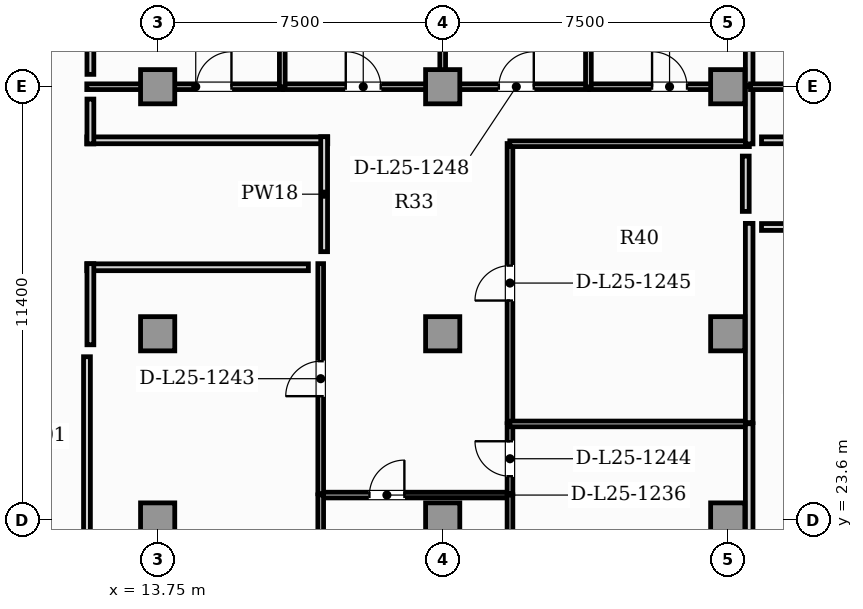
"""IFC4 building model, lengths in metres.
Left out: names, types, materials, properties, quantities, classifications, styles, units other than length and angle.
Written with IfcOpenShell. Run it as: python <this file> out.ifc"""

import sys

from ifc_helpers import new_model, si_unit, direction, frame, frame_2d, origin, origin_2d, place, context, subcontext, project, spatial, rectangle, extrude, element, fill, save


model = new_model("IFC4")
c1 = context("Model", 3, precision=1e-05, world=origin(), true_north=direction((0.0, 1.0)))
c2 = subcontext(c1, "Body", "Model", "MODEL_VIEW")
j1 = project(units=[si_unit("LENGTHUNIT", "METRE"), si_unit("PLANEANGLEUNIT", "RADIAN")], contexts=[c1])
p1 = place(None, origin())
s1 = spatial("IfcSite", under=j1, at=p1, CompositionType="ELEMENT")
p2 = place(p1, origin())
s2 = spatial("IfcBuilding", under=s1, at=p2, CompositionType="ELEMENT")
p3 = place(p2, frame((0.0, 0.0, 104.15)))
s3 = spatial("IfcBuildingStorey", under=s2, at=p3, CompositionType="ELEMENT", Elevation=104.15)
for number, where, z_axis, x_axis in (
    (1, (13.75, 23.6, 0.0), (0.0, 0.0, 1.0), (1.0, 0.0, 0.0)),
    (2, (21.25, 23.6, 0.0), (0.0, 0.0, 1.0), (1.0, 0.0, 0.0)),
    (3, (28.75, 23.6, 0.0), (0.0, 0.0, 1.0), (1.0, 0.0, 0.0)),
    (4, (13.75, 28.5, 0.0), (0.0, 0.0, 1.0), (1.0, 0.0, 0.0)),
    (5, (21.25, 28.5, 0.0), (0.0, 0.0, 1.0), (1.0, 0.0, 0.0)),
    (6, (28.75, 28.5, 0.0), (0.0, 0.0, 1.0), (1.0, 0.0, 0.0)),
    (7, (13.75, 35.0, 0.0), (0.0, 0.0, 1.0), (1.0, 0.0, 0.0)),
    (8, (21.25, 35.0, 0.0), (0.0, 0.0, 1.0), (1.0, 0.0, 0.0)),
    (9, (28.75, 35.0, 0.0), (0.0, 0.0, 1.0), (1.0, 0.0, 0.0)),
):
    element("IfcColumn", number, at=place(p3, frame(where, z_axis=z_axis, x_axis=x_axis)), inside=s3, PredefinedType="COLUMN", context=c2, shape_type="SweptSolid", body=[
        extrude(rectangle(XDim=0.9, YDim=0.9, at=origin_2d()), origin(), (0.0, 0.0, 1.0), 3.85),
    ])
p4 = place(p3, frame((11.89, 17.465, 0.0), z_axis=(0.0, 0.0, 1.0), x_axis=(0.0, 1.0, 0.0)))
e10 = element("IfcWall", 10, at=p4, inside=s3, PredefinedType="PARTITIONING", context=c2, shape_type="SweptSolid", body=[
    extrude(rectangle(XDim=10.43, YDim=0.18, at=frame_2d((5.215, 0.0))), origin(), (0.0, 0.0, 1.0), 3.6),
])
p5 = place(p3, frame((18.035, 24.256, 0.0), z_axis=(0.0, 0.0, 1.0), x_axis=(1.0, 0.0, 0.0)))
e11 = element("IfcWall", 11, at=p5, inside=s3, PredefinedType="PARTITIONING", context=c2, shape_type="SweptSolid", body=[
    extrude(rectangle(XDim=4.99, YDim=0.15, at=frame_2d((2.495, 0.0))), origin(), (0.0, 0.0, 1.0), 3.6),
])
p6 = place(p5, frame((1.287, 0.0, 0.0)))
e12 = element("IfcOpeningElement", 12, at=p6, cuts=e11, PredefinedType="OPENING", context=c2, shape_type="SweptSolid", body=[
    extrude(rectangle(XDim=0.92, YDim=2.1, at=frame_2d((0.46, 1.05))), frame((0.0, 0.085, 0.0), z_axis=(0.0, -1.0, 0.0), x_axis=(1.0, 0.0, 0.0)), (0.0, 0.0, 1.0), 0.17),
])
p7 = place(p3, frame((18.04, 17.465, 0.0), z_axis=(0.0, 0.0, 1.0), x_axis=(0.0, 1.0, 0.0)))
e13 = element("IfcWall", 13, at=p7, inside=s3, PredefinedType="PARTITIONING", context=c2, shape_type="SweptSolid", body=[
    extrude(rectangle(XDim=6.795, YDim=0.15, at=frame_2d((3.398, 0.0))), origin(), (0.0, 0.0, 1.0), 3.6),
])
p8 = place(p7, frame((2.938, 0.0, 0.0)))
e14 = element("IfcOpeningElement", 14, at=p8, cuts=e13, PredefinedType="OPENING", context=c2, shape_type="SweptSolid", body=[
    extrude(rectangle(XDim=0.92, YDim=2.1, at=frame_2d((0.46, 1.05))), frame((0.0, 0.085, 0.0), z_axis=(0.0, -1.0, 0.0), x_axis=(1.0, 0.0, 0.0)), (0.0, 0.0, 1.0), 0.17),
])
p9 = place(p3, frame((23.02, 20.899, 0.0), z_axis=(0.0, 0.0, 1.0), x_axis=(0.0, 1.0, 0.0)))
e15 = element("IfcWall", 15, at=p9, inside=s3, PredefinedType="PARTITIONING", context=c2, shape_type="SweptSolid", body=[
    extrude(rectangle(XDim=3.362, YDim=0.15, at=frame_2d((1.681, 0.0))), origin(), (0.0, 0.0, 1.0), 3.6),
])
p10 = place(p9, frame((1.221, 0.0, 0.0)))
e16 = element("IfcOpeningElement", 16, at=p10, cuts=e15, PredefinedType="OPENING", context=c2, shape_type="SweptSolid", body=[
    extrude(rectangle(XDim=0.92, YDim=2.1, at=frame_2d((0.46, 1.05))), frame((0.0, 0.085, 0.0), z_axis=(0.0, -1.0, 0.0), x_axis=(1.0, 0.0, 0.0)), (0.0, 0.0, 1.0), 0.17),
])
p11 = place(p3, frame((18.04, 24.291, 0.0), z_axis=(0.0, 0.0, 1.0), x_axis=(0.0, 1.0, 0.0)))
e17 = element("IfcWall", 17, at=p11, inside=s3, PredefinedType="PARTITIONING", context=c2, shape_type="SweptSolid", body=[
    extrude(rectangle(XDim=6.054, YDim=0.15, at=frame_2d((3.027, 0.0))), origin(), (0.0, 0.0, 1.0), 3.6),
])
p12 = place(p11, frame((2.567, 0.0, 0.0)))
e18 = element("IfcOpeningElement", 18, at=p12, cuts=e17, PredefinedType="OPENING", context=c2, shape_type="SweptSolid", body=[
    extrude(rectangle(XDim=0.92, YDim=2.1, at=frame_2d((0.46, 1.05))), frame((0.0, 0.085, 0.0), z_axis=(0.0, -1.0, 0.0), x_axis=(1.0, 0.0, 0.0)), (0.0, 0.0, 1.0), 0.17),
])
p13 = place(p3, frame((23.02, 24.291, 0.0), z_axis=(0.0, 0.0, 1.0), x_axis=(0.0, 1.0, 0.0)))
e19 = element("IfcWall", 19, at=p13, inside=s3, PredefinedType="PARTITIONING", context=c2, shape_type="SweptSolid", body=[
    extrude(rectangle(XDim=1.842, YDim=0.15, at=frame_2d((0.921, 0.0))), origin(), (0.0, 0.0, 1.0), 3.6),
])
p14 = place(p13, frame((0.461, 0.0, 0.0)))
e20 = element("IfcOpeningElement", 20, at=p14, cuts=e19, PredefinedType="OPENING", context=c2, shape_type="SweptSolid", body=[
    extrude(rectangle(XDim=0.92, YDim=2.1, at=frame_2d((0.46, 1.05))), frame((0.0, 0.085, 0.0), z_axis=(0.0, -1.0, 0.0), x_axis=(1.0, 0.0, 0.0)), (0.0, 0.0, 1.0), 0.17),
])
p15 = place(p3, frame((23.02, 26.162, 0.0), z_axis=(0.0, 0.0, 1.0), x_axis=(0.0, 1.0, 0.0)))
e21 = element("IfcWall", 21, at=p15, inside=s3, PredefinedType="PARTITIONING", context=c2, shape_type="SweptSolid", body=[
    extrude(rectangle(XDim=7.343, YDim=0.15, at=frame_2d((3.671, 0.0))), origin(), (0.0, 0.0, 1.0), 3.6),
])
p16 = place(p15, frame((3.211, 0.0, 0.0)))
e22 = element("IfcOpeningElement", 22, at=p16, cuts=e21, PredefinedType="OPENING", context=c2, shape_type="SweptSolid", body=[
    extrude(rectangle(XDim=0.92, YDim=2.1, at=frame_2d((0.46, 1.05))), frame((0.0, 0.085, 0.0), z_axis=(0.0, -1.0, 0.0), x_axis=(1.0, 0.0, 0.0)), (0.0, 0.0, 1.0), 0.17),
])
p17 = place(p3, frame((23.015, 33.5, 0.0), z_axis=(0.0, 0.0, 1.0), x_axis=(1.0, 0.0, 0.0)))
e23 = element("IfcWall", 23, at=p17, inside=s3, PredefinedType="PARTITIONING", context=c2, shape_type="SweptSolid", body=[
    extrude(rectangle(XDim=6.304, YDim=0.15, at=frame_2d((3.152, 0.0))), origin(), (0.0, 0.0, 1.0), 3.6),
])
p18 = place(p3, frame((11.885, 35.0, 0.0), z_axis=(0.0, 0.0, 1.0), x_axis=(1.0, 0.0, 0.0)))
e24 = element("IfcWall", 24, at=p18, inside=s3, PredefinedType="PARTITIONING", context=c2, shape_type="SweptSolid", body=[
    extrude(rectangle(XDim=5.149, YDim=0.15, at=frame_2d((2.574, 0.0))), origin(), (0.0, 0.0, 1.0), 2.983),
])
p19 = place(p18, frame((2.887, 0.0, 0.0)))
e25 = element("IfcOpeningElement", 25, at=p19, cuts=e24, PredefinedType="OPENING", context=c2, shape_type="SweptSolid", body=[
    extrude(rectangle(XDim=0.92, YDim=2.1, at=frame_2d((0.46, 1.05))), frame((0.0, 0.085, 0.0), z_axis=(0.0, -1.0, 0.0), x_axis=(1.0, 0.0, 0.0)), (0.0, 0.0, 1.0), 0.17),
])
p20 = place(p3, frame((17.064, 35.0, 0.0), z_axis=(0.0, 0.0, 1.0), x_axis=(1.0, 0.0, 0.0)))
e26 = element("IfcWall", 26, at=p20, inside=s3, PredefinedType="PARTITIONING", context=c2, shape_type="SweptSolid", body=[
    extrude(rectangle(XDim=4.191, YDim=0.15, at=frame_2d((2.095, 0.0))), origin(), (0.0, 0.0, 1.0), 2.983),
])
p21 = place(p20, frame((1.635, 0.0, 0.0)))
e27 = element("IfcOpeningElement", 27, at=p21, cuts=e26, PredefinedType="OPENING", context=c2, shape_type="SweptSolid", body=[
    extrude(rectangle(XDim=0.92, YDim=2.1, at=frame_2d((0.46, 1.05))), frame((0.0, 0.085, 0.0), z_axis=(0.0, -1.0, 0.0), x_axis=(1.0, 0.0, 0.0)), (0.0, 0.0, 1.0), 0.17),
])
p22 = place(p3, frame((21.285, 35.0, 0.0), z_axis=(0.0, 0.0, 1.0), x_axis=(1.0, 0.0, 0.0)))
e28 = element("IfcWall", 28, at=p22, inside=s3, PredefinedType="PARTITIONING", context=c2, shape_type="SweptSolid", body=[
    extrude(rectangle(XDim=3.804, YDim=0.15, at=frame_2d((1.902, 0.0))), origin(), (0.0, 0.0, 1.0), 2.983),
])
p23 = place(p22, frame((1.442, 0.0, 0.0)))
e29 = element("IfcOpeningElement", 29, at=p23, cuts=e28, PredefinedType="OPENING", context=c2, shape_type="SweptSolid", body=[
    extrude(rectangle(XDim=0.92, YDim=2.1, at=frame_2d((0.46, 1.05))), frame((0.0, 0.085, 0.0), z_axis=(0.0, -1.0, 0.0), x_axis=(1.0, 0.0, 0.0)), (0.0, 0.0, 1.0), 0.17),
])
p24 = place(p3, frame((25.119, 35.0, 0.0), z_axis=(0.0, 0.0, 1.0), x_axis=(1.0, 0.0, 0.0)))
e30 = element("IfcWall", 30, at=p24, inside=s3, PredefinedType="PARTITIONING", context=c2, shape_type="SweptSolid", body=[
    extrude(rectangle(XDim=4.2, YDim=0.15, at=frame_2d((2.1, 0.0))), origin(), (0.0, 0.0, 1.0), 2.983),
])
p25 = place(p24, frame((1.64, 0.0, 0.0)))
e31 = element("IfcOpeningElement", 31, at=p25, cuts=e30, PredefinedType="OPENING", context=c2, shape_type="SweptSolid", body=[
    extrude(rectangle(XDim=0.92, YDim=2.1, at=frame_2d((0.46, 1.05))), frame((0.0, 0.085, 0.0), z_axis=(0.0, -1.0, 0.0), x_axis=(1.0, 0.0, 0.0)), (0.0, 0.0, 1.0), 0.17),
])
p26 = place(p3, frame((29.314, 33.495, 0.0), z_axis=(0.0, 0.0, 1.0), x_axis=(0.0, 1.0, 0.0)))
e32 = element("IfcWall", 32, at=p26, inside=s3, PredefinedType="PARTITIONING", context=c2, shape_type="SweptSolid", body=[
    extrude(rectangle(XDim=1.51, YDim=0.2, at=frame_2d((0.755, 0.0))), origin(), (0.0, 0.0, 1.0), 3.6),
])
p27 = place(p3, frame((23.015, 26.127, 0.0), z_axis=(0.0, 0.0, 1.0), x_axis=(1.0, 0.0, 0.0)))
e33 = element("IfcWall", 33, at=p27, inside=s3, PredefinedType="PARTITIONING", context=c2, shape_type="SweptSolid", body=[
    extrude(rectangle(XDim=6.304, YDim=0.15, at=frame_2d((3.152, 0.0))), origin(), (0.0, 0.0, 1.0), 3.6),
])
p28 = place(p3, frame((29.314, 20.899, 0.0), z_axis=(0.0, 0.0, 1.0), x_axis=(0.0, 1.0, 0.0)))
e34 = element("IfcWall", 34, at=p28, inside=s3, PredefinedType="PARTITIONING", context=c2, shape_type="SweptSolid", body=[
    extrude(rectangle(XDim=5.234, YDim=0.2, at=frame_2d((2.617, 0.0))), origin(), (0.0, 0.0, 1.0), 3.6),
])
p29 = place(p3, frame((29.314, 26.162, 0.0), z_axis=(0.0, 0.0, 1.0), x_axis=(0.0, 1.0, 0.0)))
e35 = element("IfcWall", 35, at=p29, inside=s3, PredefinedType="PARTITIONING", context=c2, shape_type="SweptSolid", body=[
    extrude(rectangle(XDim=5.242, YDim=0.2, at=frame_2d((2.621, 0.0))), origin(), (0.0, 0.0, 1.0), 3.6),
])
p30 = place(p3, frame((17.029, 34.995, 0.0), z_axis=(0.0, 0.0, 1.0), x_axis=(0.0, 1.0, 0.0)))
e36 = element("IfcWall", 36, at=p30, inside=s3, PredefinedType="PARTITIONING", context=c2, shape_type="SweptSolid", body=[
    extrude(rectangle(XDim=7.995, YDim=0.15, at=frame_2d((3.998, 0.0))), origin(), (0.0, 0.0, 1.0), 3.6),
])
p31 = place(p3, frame((21.25, 34.995, 0.0), z_axis=(0.0, 0.0, 1.0), x_axis=(0.0, 1.0, 0.0)))
e37 = element("IfcWall", 37, at=p31, inside=s3, PredefinedType="PARTITIONING", context=c2, shape_type="SweptSolid", body=[
    extrude(rectangle(XDim=7.907, YDim=0.15, at=frame_2d((3.954, 0.0))), origin(), (0.0, 0.0, 1.0), 3.6),
])
p32 = place(p3, frame((25.084, 34.995, 0.0), z_axis=(0.0, 0.0, 1.0), x_axis=(0.0, 1.0, 0.0)))
e38 = element("IfcWall", 38, at=p32, inside=s3, PredefinedType="PARTITIONING", context=c2, shape_type="SweptSolid", body=[
    extrude(rectangle(XDim=7.995, YDim=0.15, at=frame_2d((3.998, 0.0))), origin(), (0.0, 0.0, 1.0), 3.6),
])
p33 = place(p3, frame((29.314, 35.035, 0.0), z_axis=(0.0, 0.0, 1.0), x_axis=(0.0, 1.0, 0.0)))
e39 = element("IfcWall", 39, at=p33, inside=s3, PredefinedType="PARTITIONING", context=c2, shape_type="SweptSolid", body=[
    extrude(rectangle(XDim=7.955, YDim=0.2, at=frame_2d((3.978, 0.0))), origin(), (0.0, 0.0, 1.0), 3.6),
])
p34 = place(p3, frame((29.349, 35.0, 0.0), z_axis=(0.0, 0.0, 1.0), x_axis=(1.0, 0.0, 0.0)))
e40 = element("IfcWall", 40, at=p34, inside=s3, PredefinedType="PARTITIONING", context=c2, shape_type="SweptSolid", body=[
    extrude(rectangle(XDim=4.774, YDim=0.15, at=frame_2d((2.387, 0.0))), origin(), (0.0, 0.0, 1.0), 2.983),
])
p35 = place(p34, frame((1.927, 0.0, 0.0)))
e41 = element("IfcOpeningElement", 41, at=p35, cuts=e40, PredefinedType="OPENING", context=c2, shape_type="SweptSolid", body=[
    extrude(rectangle(XDim=0.92, YDim=2.1, at=frame_2d((0.46, 1.05))), frame((0.0, 0.085, 0.0), z_axis=(0.0, -1.0, 0.0), x_axis=(1.0, 0.0, 0.0)), (0.0, 0.0, 1.0), 0.17),
])
p36 = place(p3, frame((18.225, 33.59, 0.0), z_axis=(0.0, 0.0, 1.0), x_axis=(-1.0, 0.0, 0.0)))
e42 = element("IfcWall", 42, at=p36, inside=s3, PredefinedType="PARTITIONING", context=c2, shape_type="SweptSolid", body=[
    extrude(rectangle(XDim=6.34, YDim=0.18, at=frame_2d((3.17, 0.0))), origin(), (0.0, 0.0, 1.0), 3.6),
])
p37 = place(p3, frame((11.98, 33.495, 0.0), z_axis=(0.0, 0.0, 1.0), x_axis=(0.0, 1.0, 0.0)))
e43 = element("IfcWall", 43, at=p37, inside=s3, PredefinedType="PARTITIONING", context=c2, shape_type="SweptSolid", body=[
    extrude(rectangle(XDim=1.18, YDim=0.18, at=frame_2d((0.59, 0.0))), origin(), (0.0, 0.0, 1.0), 3.6),
])
p38 = place(p3, frame((18.13, 30.66, 0.0), z_axis=(0.0, 0.0, 1.0), x_axis=(0.0, 1.0, 0.0)))
e44 = element("IfcWall", 44, at=p38, inside=s3, PredefinedType="PARTITIONING", context=c2, shape_type="SweptSolid", body=[
    extrude(rectangle(XDim=3.025, YDim=0.18, at=frame_2d((1.513, 0.0))), origin(), (0.0, 0.0, 1.0), 3.6),
])
p39 = place(p3, frame((11.885, 30.25, 0.0), z_axis=(0.0, 0.0, 1.0), x_axis=(1.0, 0.0, 0.0)))
e45 = element("IfcWall", 45, at=p39, inside=s3, PredefinedType="PARTITIONING", context=c2, shape_type="SweptSolid", body=[
    extrude(rectangle(XDim=5.83, YDim=0.18, at=frame_2d((2.915, 0.0))), origin(), (0.0, 0.0, 1.0), 3.6),
])
p40 = place(p3, frame((11.98, 28.21, 0.0), z_axis=(0.0, 0.0, 1.0), x_axis=(0.0, 1.0, 0.0)))
e46 = element("IfcWall", 46, at=p40, inside=s3, PredefinedType="PARTITIONING", context=c2, shape_type="SweptSolid", body=[
    extrude(rectangle(XDim=2.135, YDim=0.18, at=frame_2d((1.067, 0.0))), origin(), (0.0, 0.0, 1.0), 3.6),
])
p41 = place(p3, frame((29.224, 33.175, 0.0), z_axis=(0.0, 0.0, 1.0), x_axis=(0.0, -1.0, 0.0)))
e47 = element("IfcWall", 47, at=p41, inside=s3, PredefinedType="PARTITIONING", context=c2, shape_type="SweptSolid", body=[
    extrude(rectangle(XDim=1.456, YDim=0.18, at=frame_2d((0.728, 0.0))), origin(), (0.0, 0.0, 1.0), 3.6),
])
p42 = place(p3, frame((11.98, 35.325, 0.0), z_axis=(0.0, 0.0, 1.0), x_axis=(0.0, 1.0, 0.0)))
e48 = element("IfcWall", 48, at=p42, inside=s3, PredefinedType="PARTITIONING", context=c2, shape_type="SweptSolid", body=[
    extrude(rectangle(XDim=7.665, YDim=0.18, at=frame_2d((3.833, 0.0))), origin(), (0.0, 0.0, 1.0), 3.6),
])
p43 = place(p3, frame((35.191, 33.59, 0.0), z_axis=(0.0, 0.0, 1.0), x_axis=(-1.0, 0.0, 0.0)))
e49 = element("IfcWall", 49, at=p43, inside=s3, PredefinedType="PARTITIONING", context=c2, shape_type="SweptSolid", body=[
    extrude(rectangle(XDim=5.552, YDim=0.18, at=frame_2d((2.776, 0.0))), origin(), (0.0, 0.0, 1.0), 3.6),
])
p44 = place(p3, frame((29.639, 31.309, 0.0), z_axis=(0.0, 0.0, 1.0), x_axis=(1.0, 0.0, 0.0)))
e50 = element("IfcWall", 50, at=p44, inside=s3, PredefinedType="PARTITIONING", context=c2, shape_type="SweptSolid", body=[
    extrude(rectangle(XDim=5.042, YDim=0.18, at=frame_2d((2.521, 0.0))), origin(), (0.0, 0.0, 1.0), 3.6),
])
p45 = place(p6, origin())
e51 = element("IfcDoor", 51, at=p45, inside=s3, OperationType="SINGLE_SWING_RIGHT", PredefinedType="DOOR", context=c2, shape_type="SweptSolid", body=[
    extrude(rectangle(XDim=0.92, YDim=2.1, at=frame_2d((0.46, 1.05))), frame((0.0, 0.025, 0.0), z_axis=(0.0, -1.0, 0.0), x_axis=(1.0, 0.0, 0.0)), (0.0, 0.0, 1.0), 0.05),
])
fill(e12, e51)
p46 = place(p12, origin())
e52 = element("IfcDoor", 52, at=p46, inside=s3, OperationType="SINGLE_SWING_LEFT", PredefinedType="DOOR", context=c2, shape_type="SweptSolid", body=[
    extrude(rectangle(XDim=0.92, YDim=2.1, at=frame_2d((0.46, 1.05))), frame((0.0, 0.025, 0.0), z_axis=(0.0, -1.0, 0.0), x_axis=(1.0, 0.0, 0.0)), (0.0, 0.0, 1.0), 0.05),
])
fill(e18, e52)
p47 = place(p14, origin())
e53 = element("IfcDoor", 53, at=p47, inside=s3, OperationType="SINGLE_SWING_RIGHT", PredefinedType="DOOR", context=c2, shape_type="SweptSolid", body=[
    extrude(rectangle(XDim=0.92, YDim=2.1, at=frame_2d((0.46, 1.05))), frame((0.0, 0.025, 0.0), z_axis=(0.0, -1.0, 0.0), x_axis=(1.0, 0.0, 0.0)), (0.0, 0.0, 1.0), 0.05),
])
fill(e20, e53)
p48 = place(p16, origin())
e54 = element("IfcDoor", 54, at=p48, inside=s3, OperationType="SINGLE_SWING_LEFT", PredefinedType="DOOR", context=c2, shape_type="SweptSolid", body=[
    extrude(rectangle(XDim=0.92, YDim=2.1, at=frame_2d((0.46, 1.05))), frame((0.0, 0.025, 0.0), z_axis=(0.0, -1.0, 0.0), x_axis=(1.0, 0.0, 0.0)), (0.0, 0.0, 1.0), 0.05),
])
fill(e22, e54)
p49 = place(p19, origin())
e55 = element("IfcDoor", 55, at=p49, inside=s3, OperationType="SINGLE_SWING_RIGHT", PredefinedType="DOOR", context=c2, shape_type="SweptSolid", body=[
    extrude(rectangle(XDim=0.92, YDim=2.1, at=frame_2d((0.46, 1.05))), frame((0.0, 0.025, 0.0), z_axis=(0.0, -1.0, 0.0), x_axis=(1.0, 0.0, 0.0)), (0.0, 0.0, 1.0), 0.05),
])
fill(e25, e55)
p50 = place(p21, origin())
e56 = element("IfcDoor", 56, at=p50, inside=s3, OperationType="SINGLE_SWING_LEFT", PredefinedType="DOOR", context=c2, shape_type="SweptSolid", body=[
    extrude(rectangle(XDim=0.92, YDim=2.1, at=frame_2d((0.46, 1.05))), frame((0.0, 0.025, 0.0), z_axis=(0.0, -1.0, 0.0), x_axis=(1.0, 0.0, 0.0)), (0.0, 0.0, 1.0), 0.05),
])
fill(e27, e56)
p51 = place(p23, origin())
e57 = element("IfcDoor", 57, at=p51, inside=s3, OperationType="SINGLE_SWING_RIGHT", PredefinedType="DOOR", context=c2, shape_type="SweptSolid", body=[
    extrude(rectangle(XDim=0.92, YDim=2.1, at=frame_2d((0.46, 1.05))), frame((0.0, 0.025, 0.0), z_axis=(0.0, -1.0, 0.0), x_axis=(1.0, 0.0, 0.0)), (0.0, 0.0, 1.0), 0.05),
])
fill(e29, e57)
p52 = place(p25, origin())
e58 = element("IfcDoor", 58, at=p52, inside=s3, OperationType="SINGLE_SWING_LEFT", PredefinedType="DOOR", context=c2, shape_type="SweptSolid", body=[
    extrude(rectangle(XDim=0.92, YDim=2.1, at=frame_2d((0.46, 1.05))), frame((0.0, 0.025, 0.0), z_axis=(0.0, -1.0, 0.0), x_axis=(1.0, 0.0, 0.0)), (0.0, 0.0, 1.0), 0.05),
])
fill(e31, e58)
save(model, sys.argv[1])
